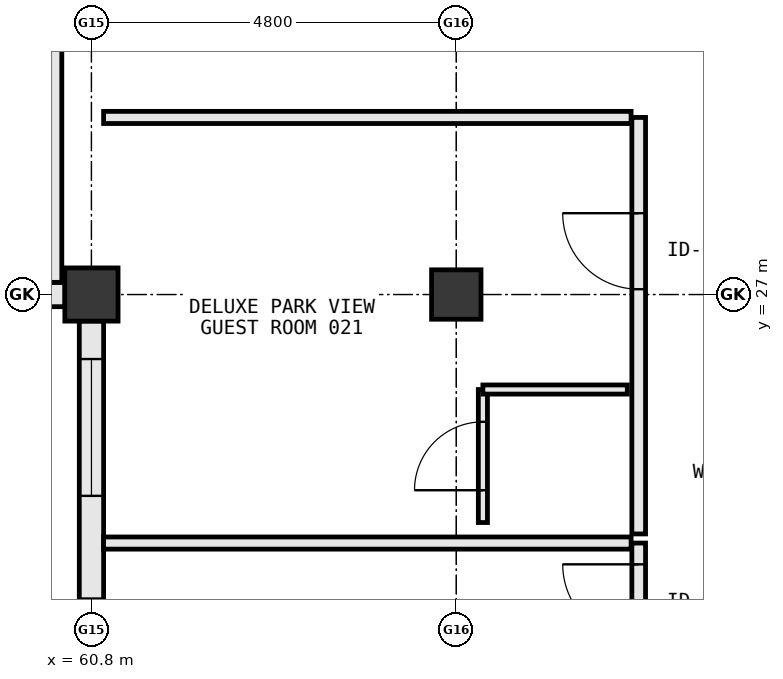
"""IFC4 building model, lengths in metres.
Left out: names, types, materials, properties, quantities, classifications, styles, units other than length and angle.
Written with IfcOpenShell. Run it as: python <this file> out.ifc"""

import sys

from ifc_helpers import new_model, si_unit, direction, frame, frame_2d, origin, origin_2d, place, context, subcontext, project, spatial, rectangle, extrude, element, fill, save


model = new_model("IFC4")
c1 = context("Model", 3, precision=1e-05, world=origin(), true_north=direction((0.0, 1.0)))
c2 = subcontext(c1, "Body", "Model", "MODEL_VIEW")
j1 = project(units=[si_unit("LENGTHUNIT", "METRE"), si_unit("PLANEANGLEUNIT", "RADIAN")], contexts=[c1])
p1 = place(None, origin())
s1 = spatial("IfcSite", under=j1, at=p1, CompositionType="ELEMENT")
p2 = place(p1, origin())
s2 = spatial("IfcBuilding", under=s1, at=p2, CompositionType="ELEMENT")
p3 = place(p2, frame((0.0, 0.0, 10.8)))
s3 = spatial("IfcBuildingStorey", under=s2, at=p3, CompositionType="ELEMENT", Elevation=10.8)
p4 = place(p3, frame((60.8, 27.0, 0.0), z_axis=(0.0, 0.0, 1.0), x_axis=(1.0, 0.0, 0.0)))
e1 = element("IfcColumn", 1, at=p4, inside=s3, PredefinedType="COLUMN", context=c2, shape_type="SweptSolid", body=[
    extrude(rectangle(XDim=0.7, YDim=0.7, at=origin_2d()), origin(), (0.0, 0.0, 1.0), 5.4),
])
p5 = place(p3, frame((65.6, 27.0, 0.0), z_axis=(0.0, 0.0, 1.0), x_axis=(1.0, 0.0, 0.0)))
e2 = element("IfcColumn", 2, at=p5, inside=s3, PredefinedType="COLUMN", context=c2, shape_type="SweptSolid", body=[
    extrude(rectangle(XDim=0.65, YDim=0.65, at=origin_2d()), origin(), (0.0, 0.0, 1.0), 5.4),
])
p6 = place(p3, frame((51.623, 27.0, 0.0), z_axis=(0.0, 0.0, 1.0), x_axis=(1.0, 0.0, 0.0)))
e3 = element("IfcWall", 3, at=p6, inside=s3, PredefinedType="STANDARD", context=c2, shape_type="SweptSolid", body=[
    extrude(rectangle(XDim=8.829, YDim=0.32, at=frame_2d((4.415, 0.0))), origin(), (0.0, 0.0, 1.0), 4.075),
])
p7 = place(p6, frame((1.197, 0.0, 0.85)))
e4 = element("IfcOpeningElement", 4, at=p7, cuts=e3, PredefinedType="OPENING", context=c2, shape_type="SweptSolid", body=[
    extrude(rectangle(XDim=1.8, YDim=1.85, at=frame_2d((0.9, 0.925))), frame((0.0, 0.172, 0.0), z_axis=(0.0, -1.0, 0.0), x_axis=(1.0, 0.0, 0.0)), (0.0, 0.0, 1.0), 0.344),
])
p8 = place(p6, frame((5.377, 0.0, 0.85)))
e5 = element("IfcOpeningElement", 5, at=p8, cuts=e3, PredefinedType="OPENING", context=c2, shape_type="SweptSolid", body=[
    extrude(rectangle(XDim=1.8, YDim=1.85, at=frame_2d((0.9, 0.925))), frame((0.0, 0.172, 0.0), z_axis=(0.0, -1.0, 0.0), x_axis=(1.0, 0.0, 0.0)), (0.0, 0.0, 1.0), 0.344),
])
p9 = place(p3, frame((60.8, 26.652, 0.0), z_axis=(0.0, 0.0, 1.0), x_axis=(0.0, -1.0, 0.0)))
e6 = element("IfcWall", 6, at=p9, inside=s3, PredefinedType="STANDARD", context=c2, shape_type="SweptSolid", body=[
    extrude(rectangle(XDim=7.704, YDim=0.32, at=frame_2d((3.852, 0.0))), origin(), (0.0, 0.0, 1.0), 4.255),
])
p10 = place(p9, frame((6.478, 0.0, 0.85)))
e7 = element("IfcOpeningElement", 7, at=p10, cuts=e6, PredefinedType="OPENING", context=c2, shape_type="SweptSolid", body=[
    extrude(rectangle(XDim=1.05, YDim=1.45, at=frame_2d((0.525, 0.725))), frame((0.0, 0.172, 0.0), z_axis=(0.0, -1.0, 0.0), x_axis=(1.0, 0.0, 0.0)), (0.0, 0.0, 1.0), 0.344),
])
p11 = place(p9, frame((3.652, 0.0, 0.85)))
e8 = element("IfcOpeningElement", 8, at=p11, cuts=e6, PredefinedType="OPENING", context=c2, shape_type="SweptSolid", body=[
    extrude(rectangle(XDim=1.8, YDim=1.85, at=frame_2d((0.9, 0.925))), frame((0.0, 0.172, 0.0), z_axis=(0.0, -1.0, 0.0), x_axis=(1.0, 0.0, 0.0)), (0.0, 0.0, 1.0), 0.344),
])
p12 = place(p9, frame((0.501, 0.0, 0.85)))
e9 = element("IfcOpeningElement", 9, at=p12, cuts=e6, PredefinedType="OPENING", context=c2, shape_type="SweptSolid", body=[
    extrude(rectangle(XDim=1.8, YDim=1.85, at=frame_2d((0.9, 0.925))), frame((0.0, 0.172, 0.0), z_axis=(0.0, -1.0, 0.0), x_axis=(1.0, 0.0, 0.0)), (0.0, 0.0, 1.0), 0.344),
])
p13 = place(p3, frame((68.0, 20.47, 0.0), z_axis=(0.0, 0.0, 1.0), x_axis=(0.0, 1.0, 0.0)))
e10 = element("IfcWall", 10, at=p13, inside=s3, PredefinedType="PARTITIONING", context=c2, shape_type="SweptSolid", body=[
    extrude(rectangle(XDim=3.26, YDim=0.18, at=frame_2d((1.63, 0.0))), origin(), (0.0, 0.0, 1.0), 4.8),
])
p14 = place(p13, frame((1.98, 0.0, 0.0)))
e11 = element("IfcOpeningElement", 11, at=p14, cuts=e10, PredefinedType="OPENING", context=c2, shape_type="SweptSolid", body=[
    extrude(rectangle(XDim=1.0, YDim=2.2, at=frame_2d((0.5, 1.1))), frame((0.0, 0.102, 0.0), z_axis=(0.0, -1.0, 0.0), x_axis=(1.0, 0.0, 0.0)), (0.0, 0.0, 1.0), 0.204),
])
p15 = place(p3, frame((60.96, 23.73, 0.0), z_axis=(0.0, 0.0, 1.0), x_axis=(1.0, 0.0, 0.0)))
e12 = element("IfcWall", 12, at=p15, inside=s3, PredefinedType="PARTITIONING", context=c2, shape_type="SweptSolid", body=[
    extrude(rectangle(XDim=6.94, YDim=0.16, at=frame_2d((3.47, 0.0))), origin(), (0.0, 0.0, 1.0), 4.8),
])
p16 = place(p3, frame((68.0, 23.85, 0.0), z_axis=(0.0, 0.0, 1.0), x_axis=(0.0, 1.0, 0.0)))
e13 = element("IfcWall", 13, at=p16, inside=s3, PredefinedType="PARTITIONING", context=c2, shape_type="SweptSolid", body=[
    extrude(rectangle(XDim=5.48, YDim=0.18, at=frame_2d((2.74, 0.0))), origin(), (0.0, 0.0, 1.0), 4.8),
])
p17 = place(p16, frame((3.22, 0.0, 0.0)))
e14 = element("IfcOpeningElement", 14, at=p17, cuts=e13, PredefinedType="OPENING", context=c2, shape_type="SweptSolid", body=[
    extrude(rectangle(XDim=1.0, YDim=2.2, at=frame_2d((0.5, 1.1))), frame((0.0, 0.102, 0.0), z_axis=(0.0, -1.0, 0.0), x_axis=(1.0, 0.0, 0.0)), (0.0, 0.0, 1.0), 0.204),
])
p18 = place(p3, frame((60.96, 29.33, 0.0), z_axis=(0.0, 0.0, 1.0), x_axis=(1.0, 0.0, 0.0)))
e15 = element("IfcWall", 15, at=p18, inside=s3, PredefinedType="PARTITIONING", context=c2, shape_type="SweptSolid", body=[
    extrude(rectangle(XDim=6.94, YDim=0.16, at=frame_2d((3.47, 0.0))), origin(), (0.0, 0.0, 1.0), 4.8),
])
p19 = place(p3, frame((65.95, 24.0, 0.0), z_axis=(0.0, 0.0, 1.0), x_axis=(0.0, 1.0, 0.0)))
e16 = element("IfcWall", 16, at=p19, inside=s3, PredefinedType="PARTITIONING", context=c2, shape_type="SweptSolid", body=[
    extrude(rectangle(XDim=1.75, YDim=0.12, at=frame_2d((0.875, 0.0))), origin(), (0.0, 0.0, 1.0), 4.255),
])
p20 = place(p19, frame((0.425, 0.0, 0.0)))
e17 = element("IfcOpeningElement", 17, at=p20, cuts=e16, PredefinedType="OPENING", context=c2, shape_type="SweptSolid", body=[
    extrude(rectangle(XDim=0.9, YDim=2.15, at=frame_2d((0.45, 1.075))), frame((0.0, 0.072, 0.0), z_axis=(0.0, -1.0, 0.0), x_axis=(1.0, 0.0, 0.0)), (0.0, 0.0, 1.0), 0.144),
])
p21 = place(p3, frame((65.95, 25.75, 0.0), z_axis=(0.0, 0.0, 1.0), x_axis=(1.0, 0.0, 0.0)))
e18 = element("IfcWall", 18, at=p21, inside=s3, PredefinedType="PARTITIONING", context=c2, shape_type="SweptSolid", body=[
    extrude(rectangle(XDim=1.9, YDim=0.12, at=frame_2d((0.95, 0.0))), origin(), (0.0, 0.0, 1.0), 4.8),
])
p22 = place(p3, frame((60.33, 27.16, 0.0), z_axis=(0.0, 0.0, 1.0), x_axis=(0.0, 1.0, 0.0)))
e19 = element("IfcWall", 19, at=p22, inside=s3, PredefinedType="PARTITIONING", context=c2, shape_type="SweptSolid", body=[
    extrude(rectangle(XDim=10.34, YDim=0.16, at=frame_2d((5.17, 0.0))), origin(), (0.0, 0.0, 1.0), 4.8),
])
p23 = place(p11, origin())
e20 = element("IfcWindow", 20, at=p23, inside=s3, PartitioningType="SINGLE_PANEL", PredefinedType="WINDOW", context=c2, shape_type="SweptSolid", body=[
    extrude(rectangle(XDim=1.8, YDim=1.85, at=frame_2d((0.9, 0.925))), frame((0.0, 0.03, 0.0), z_axis=(0.0, -1.0, 0.0), x_axis=(1.0, 0.0, 0.0)), (0.0, 0.0, 1.0), 0.06),
])
fill(e8, e20)
p24 = place(p12, origin())
e21 = element("IfcWindow", 21, at=p24, inside=s3, PartitioningType="SINGLE_PANEL", PredefinedType="WINDOW", context=c2, shape_type="SweptSolid", body=[
    extrude(rectangle(XDim=1.8, YDim=1.85, at=frame_2d((0.9, 0.925))), frame((0.0, 0.03, 0.0), z_axis=(0.0, -1.0, 0.0), x_axis=(1.0, 0.0, 0.0)), (0.0, 0.0, 1.0), 0.06),
])
fill(e9, e21)
p25 = place(p14, origin())
e22 = element("IfcDoor", 22, at=p25, inside=s3, OperationType="SINGLE_SWING_RIGHT", PredefinedType="DOOR", context=c2, shape_type="SweptSolid", body=[
    extrude(rectangle(XDim=1.0, YDim=2.2, at=frame_2d((0.5, 1.1))), frame((0.0, 0.025, 0.0), z_axis=(0.0, -1.0, 0.0), x_axis=(1.0, 0.0, 0.0)), (0.0, 0.0, 1.0), 0.05),
])
fill(e11, e22)
p26 = place(p17, origin())
e23 = element("IfcDoor", 23, at=p26, inside=s3, OperationType="SINGLE_SWING_RIGHT", PredefinedType="DOOR", context=c2, shape_type="SweptSolid", body=[
    extrude(rectangle(XDim=1.0, YDim=2.2, at=frame_2d((0.5, 1.1))), frame((0.0, 0.025, 0.0), z_axis=(0.0, -1.0, 0.0), x_axis=(1.0, 0.0, 0.0)), (0.0, 0.0, 1.0), 0.05),
])
fill(e14, e23)
p27 = place(p20, origin())
e24 = element("IfcDoor", 24, at=p27, inside=s3, OperationType="SINGLE_SWING_LEFT", PredefinedType="DOOR", context=c2, shape_type="SweptSolid", body=[
    extrude(rectangle(XDim=0.9, YDim=2.15, at=frame_2d((0.45, 1.075))), frame((0.0, 0.025, 0.0), z_axis=(0.0, -1.0, 0.0), x_axis=(1.0, 0.0, 0.0)), (0.0, 0.0, 1.0), 0.05),
])
fill(e17, e24)
save(model, sys.argv[1])
